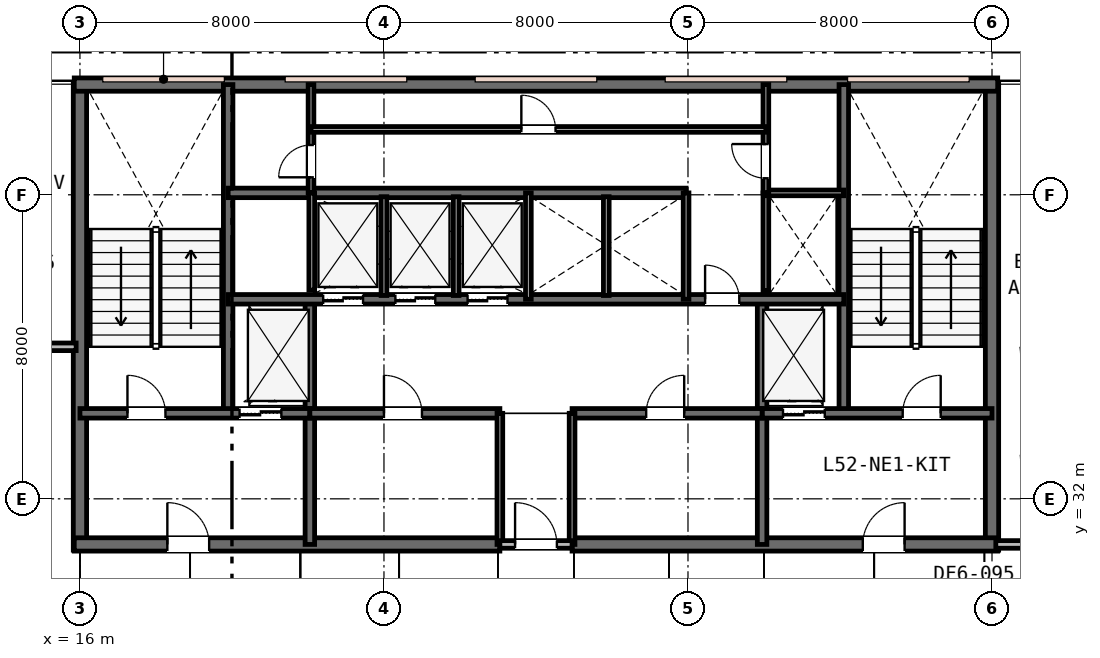
"""IFC4 building model, lengths in metres.
Left out: names, types, materials, properties, quantities, classifications, styles, units other than length and angle.
Written with IfcOpenShell. Run it as: python <this file> out.ifc"""

import sys

from ifc_helpers import new_model, si_unit, direction, frame, frame_2d, origin, place, context, subcontext, project, spatial, rectangle, extrude, element, fill, save


model = new_model("IFC4")
c1 = context("Model", 3, precision=1e-05, world=origin(), true_north=direction((0.0, 1.0)))
c2 = subcontext(c1, "Body", "Model", "MODEL_VIEW")
j1 = project(units=[si_unit("LENGTHUNIT", "METRE"), si_unit("PLANEANGLEUNIT", "RADIAN")], contexts=[c1])
p1 = place(None, origin())
s1 = spatial("IfcSite", under=j1, at=p1, CompositionType="ELEMENT")
p2 = place(p1, origin())
s2 = spatial("IfcBuilding", under=s1, at=p2, CompositionType="ELEMENT")
p3 = place(p2, frame((0.0, 0.0, 201.0)))
s3 = spatial("IfcBuildingStorey", under=s2, at=p3, CompositionType="ELEMENT", Elevation=201.0)
for number, where, z_axis, x_axis in (
    (1, (16.0, 30.65, 0.0), (0.0, 0.0, 1.0), (0.0, 1.0, 0.0)),
    (2, (40.0, 30.65, 0.0), (0.0, 0.0, 1.0), (0.0, 1.0, 0.0)),
):
    element("IfcWall", number, at=place(p3, frame(where, z_axis=z_axis, x_axis=x_axis)), inside=s3, PredefinedType="SHEAR", context=c2, shape_type="SweptSolid", body=[
        extrude(rectangle(XDim=12.3, YDim=0.35, at=frame_2d((6.15, 0.0))), origin(), (0.0, 0.0, 1.0), 3.6),
    ])
p4 = place(p3, frame((15.85, 42.9, 0.0), z_axis=(0.0, 0.0, 1.0), x_axis=(1.0, 0.0, 0.0)))
e3 = element("IfcWall", 3, at=p4, inside=s3, PredefinedType="SHEAR", context=c2, shape_type="SweptSolid", body=[
    extrude(rectangle(XDim=24.3, YDim=0.35, at=frame_2d((12.15, 0.0))), origin(), (0.0, 0.0, 1.0), 3.6),
])
p5 = place(p3, frame((15.85, 30.8, 0.0), z_axis=(0.0, 0.0, 1.0), x_axis=(1.0, 0.0, 0.0)))
e4 = element("IfcWall", 4, at=p5, inside=s3, PredefinedType="SHEAR", context=c2, shape_type="SweptSolid", body=[
    extrude(rectangle(XDim=11.2, YDim=0.35, at=frame_2d((5.6, 0.0))), origin(), (0.0, 0.0, 1.0), 3.6),
])
p6 = place(p5, frame((2.45, 0.0, 0.0)))
e5 = element("IfcOpeningElement", 5, at=p6, cuts=e4, PredefinedType="OPENING", context=c2, shape_type="SweptSolid", body=[
    extrude(rectangle(XDim=1.1, YDim=2.15, at=frame_2d((0.55, 1.075))), frame((0.0, 0.185, 0.0), z_axis=(0.0, -1.0, 0.0), x_axis=(1.0, 0.0, 0.0)), (0.0, 0.0, 1.0), 0.37),
])
p7 = place(p3, frame((28.95, 30.8, 0.0), z_axis=(0.0, 0.0, 1.0), x_axis=(1.0, 0.0, 0.0)))
e6 = element("IfcWall", 6, at=p7, inside=s3, PredefinedType="SHEAR", context=c2, shape_type="SweptSolid", body=[
    extrude(rectangle(XDim=11.2, YDim=0.35, at=frame_2d((5.6, 0.0))), origin(), (0.0, 0.0, 1.0), 3.6),
])
p8 = place(p7, frame((7.65, 0.0, 0.0)))
e7 = element("IfcOpeningElement", 7, at=p8, cuts=e6, PredefinedType="OPENING", context=c2, shape_type="SweptSolid", body=[
    extrude(rectangle(XDim=1.1, YDim=2.15, at=frame_2d((0.55, 1.075))), frame((0.0, 0.185, 0.0), z_axis=(0.0, -1.0, 0.0), x_axis=(1.0, 0.0, 0.0)), (0.0, 0.0, 1.0), 0.37),
])
for number, where, z_axis, x_axis in (
    (8, (19.9, 34.25, 0.0), (0.0, 0.0, 1.0), (0.0, 1.0, 0.0)),
    (9, (36.1, 34.25, 0.0), (0.0, 0.0, 1.0), (0.0, 1.0, 0.0)),
):
    element("IfcWall", number, at=place(p3, frame(where, z_axis=z_axis, x_axis=x_axis)), inside=s3, PredefinedType="SHEAR", context=c2, shape_type="SweptSolid", body=[
        extrude(rectangle(XDim=8.65, YDim=0.25, at=frame_2d((4.325, 0.0))), origin(), (0.0, 0.0, 1.0), 3.6),
    ])
for number, where, z_axis, x_axis in (
    (10, (22.05, 30.8, 0.0), (0.0, 0.0, 1.0), (0.0, 1.0, 0.0)),
    (11, (33.95, 30.8, 0.0), (0.0, 0.0, 1.0), (0.0, 1.0, 0.0)),
):
    element("IfcWall", number, at=place(p3, frame(where, z_axis=z_axis, x_axis=x_axis)), inside=s3, PredefinedType="SHEAR", context=c2, shape_type="SweptSolid", body=[
        extrude(rectangle(XDim=6.45, YDim=0.25, at=frame_2d((3.225, 0.0))), origin(), (0.0, 0.0, 1.0), 3.6),
    ])
p9 = place(p3, frame((16.0, 34.25, 0.0), z_axis=(0.0, 0.0, 1.0), x_axis=(1.0, 0.0, 0.0)))
e12 = element("IfcWall", 12, at=p9, inside=s3, PredefinedType="SHEAR", context=c2, shape_type="SweptSolid", body=[
    extrude(rectangle(XDim=6.05, YDim=0.25, at=frame_2d((3.025, 0.0))), origin(), (0.0, 0.0, 1.0), 3.6),
])
p10 = place(p9, frame((1.25, 0.0, 0.0)))
e13 = element("IfcOpeningElement", 13, at=p10, cuts=e12, PredefinedType="OPENING", context=c2, shape_type="SweptSolid", body=[
    extrude(rectangle(XDim=1.0, YDim=2.15, at=frame_2d((0.5, 1.075))), frame((0.0, 0.135, 0.0), z_axis=(0.0, -1.0, 0.0), x_axis=(1.0, 0.0, 0.0)), (0.0, 0.0, 1.0), 0.27),
])
p11 = place(p9, frame((4.2, 0.0, 0.0)))
e14 = element("IfcOpeningElement", 14, at=p11, cuts=e12, PredefinedType="OPENING", context=c2, shape_type="SweptSolid", body=[
    extrude(rectangle(XDim=1.1, YDim=2.15, at=frame_2d((0.55, 1.075))), frame((0.0, 0.135, 0.0), z_axis=(0.0, -1.0, 0.0), x_axis=(1.0, 0.0, 0.0)), (0.0, 0.0, 1.0), 0.27),
])
p12 = place(p3, frame((33.95, 34.25, 0.0), z_axis=(0.0, 0.0, 1.0), x_axis=(1.0, 0.0, 0.0)))
e15 = element("IfcWall", 15, at=p12, inside=s3, PredefinedType="SHEAR", context=c2, shape_type="SweptSolid", body=[
    extrude(rectangle(XDim=6.05, YDim=0.25, at=frame_2d((3.025, 0.0))), origin(), (0.0, 0.0, 1.0), 3.6),
])
p13 = place(p12, frame((3.7, 0.0, 0.0)))
e16 = element("IfcOpeningElement", 16, at=p13, cuts=e15, PredefinedType="OPENING", context=c2, shape_type="SweptSolid", body=[
    extrude(rectangle(XDim=1.0, YDim=2.15, at=frame_2d((0.5, 1.075))), frame((0.0, 0.135, 0.0), z_axis=(0.0, -1.0, 0.0), x_axis=(1.0, 0.0, 0.0)), (0.0, 0.0, 1.0), 0.27),
])
p14 = place(p12, frame((0.55, 0.0, 0.0)))
e17 = element("IfcOpeningElement", 17, at=p14, cuts=e15, PredefinedType="OPENING", context=c2, shape_type="SweptSolid", body=[
    extrude(rectangle(XDim=1.1, YDim=2.15, at=frame_2d((0.55, 1.075))), frame((0.0, 0.135, 0.0), z_axis=(0.0, -1.0, 0.0), x_axis=(1.0, 0.0, 0.0)), (0.0, 0.0, 1.0), 0.27),
])
p15 = place(p3, frame((22.05, 34.25, 0.0), z_axis=(0.0, 0.0, 1.0), x_axis=(1.0, 0.0, 0.0)))
e18 = element("IfcWall", 18, at=p15, inside=s3, PredefinedType="SHEAR", context=c2, shape_type="SweptSolid", body=[
    extrude(rectangle(XDim=5.0, YDim=0.25, at=frame_2d((2.5, 0.0))), origin(), (0.0, 0.0, 1.0), 3.6),
])
p16 = place(p15, frame((1.95, 0.0, 0.0)))
e19 = element("IfcOpeningElement", 19, at=p16, cuts=e18, PredefinedType="OPENING", context=c2, shape_type="SweptSolid", body=[
    extrude(rectangle(XDim=1.0, YDim=2.15, at=frame_2d((0.5, 1.075))), frame((0.0, 0.135, 0.0), z_axis=(0.0, -1.0, 0.0), x_axis=(1.0, 0.0, 0.0)), (0.0, 0.0, 1.0), 0.27),
])
p17 = place(p3, frame((28.95, 34.25, 0.0), z_axis=(0.0, 0.0, 1.0), x_axis=(1.0, 0.0, 0.0)))
e20 = element("IfcWall", 20, at=p17, inside=s3, PredefinedType="SHEAR", context=c2, shape_type="SweptSolid", body=[
    extrude(rectangle(XDim=5.0, YDim=0.25, at=frame_2d((2.5, 0.0))), origin(), (0.0, 0.0, 1.0), 3.6),
])
p18 = place(p17, frame((1.95, 0.0, 0.0)))
e21 = element("IfcOpeningElement", 21, at=p18, cuts=e20, PredefinedType="OPENING", context=c2, shape_type="SweptSolid", body=[
    extrude(rectangle(XDim=1.0, YDim=2.15, at=frame_2d((0.5, 1.075))), frame((0.0, 0.135, 0.0), z_axis=(0.0, -1.0, 0.0), x_axis=(1.0, 0.0, 0.0)), (0.0, 0.0, 1.0), 0.27),
])
p19 = place(p3, frame((19.9, 37.25, 0.0), z_axis=(0.0, 0.0, 1.0), x_axis=(1.0, 0.0, 0.0)))
e22 = element("IfcWall", 22, at=p19, inside=s3, PredefinedType="SHEAR", context=c2, shape_type="SweptSolid", body=[
    extrude(rectangle(XDim=16.2, YDim=0.25, at=frame_2d((8.1, 0.0))), origin(), (0.0, 0.0, 1.0), 3.6),
])
p20 = place(p19, frame((12.55, 0.0, 0.0)))
e23 = element("IfcOpeningElement", 23, at=p20, cuts=e22, PredefinedType="OPENING", context=c2, shape_type="SweptSolid", body=[
    extrude(rectangle(XDim=0.9, YDim=2.15, at=frame_2d((0.45, 1.075))), frame((0.0, 0.135, 0.0), z_axis=(0.0, -1.0, 0.0), x_axis=(1.0, 0.0, 0.0)), (0.0, 0.0, 1.0), 0.27),
])
p21 = place(p19, frame((2.5, 0.0, 0.0)))
e24 = element("IfcOpeningElement", 24, at=p21, cuts=e22, PredefinedType="OPENING", context=c2, shape_type="SweptSolid", body=[
    extrude(rectangle(XDim=1.05, YDim=2.15, at=frame_2d((0.525, 1.075))), frame((0.0, 0.135, 0.0), z_axis=(0.0, -1.0, 0.0), x_axis=(1.0, 0.0, 0.0)), (0.0, 0.0, 1.0), 0.27),
])
p22 = place(p19, frame((4.4, 0.0, 0.0)))
e25 = element("IfcOpeningElement", 25, at=p22, cuts=e22, PredefinedType="OPENING", context=c2, shape_type="SweptSolid", body=[
    extrude(rectangle(XDim=1.05, YDim=2.15, at=frame_2d((0.525, 1.075))), frame((0.0, 0.135, 0.0), z_axis=(0.0, -1.0, 0.0), x_axis=(1.0, 0.0, 0.0)), (0.0, 0.0, 1.0), 0.27),
])
p23 = place(p19, frame((6.3, 0.0, 0.0)))
e26 = element("IfcOpeningElement", 26, at=p23, cuts=e22, PredefinedType="OPENING", context=c2, shape_type="SweptSolid", body=[
    extrude(rectangle(XDim=1.05, YDim=2.15, at=frame_2d((0.525, 1.075))), frame((0.0, 0.135, 0.0), z_axis=(0.0, -1.0, 0.0), x_axis=(1.0, 0.0, 0.0)), (0.0, 0.0, 1.0), 0.27),
])
p24 = place(p3, frame((19.9, 40.05, 0.0), z_axis=(0.0, 0.0, 1.0), x_axis=(1.0, 0.0, 0.0)))
e27 = element("IfcWall", 27, at=p24, inside=s3, PredefinedType="SHEAR", context=c2, shape_type="SweptSolid", body=[
    extrude(rectangle(XDim=12.05, YDim=0.25, at=frame_2d((6.025, 0.0))), origin(), (0.0, 0.0, 1.0), 3.6),
])
for number, where, z_axis, x_axis in (
    (28, (27.05, 30.8, 0.0), (0.0, 0.0, 1.0), (0.0, 1.0, 0.0)),
    (29, (28.95, 30.8, 0.0), (0.0, 0.0, 1.0), (0.0, 1.0, 0.0)),
):
    element("IfcWall", number, at=place(p3, frame(where, z_axis=z_axis, x_axis=x_axis)), inside=s3, PredefinedType="PLUMBINGWALL", context=c2, shape_type="SweptSolid", body=[
        extrude(rectangle(XDim=3.45, YDim=0.15, at=frame_2d((1.725, 0.0))), origin(), (0.0, 0.0, 1.0), 3.02),
    ])
p25 = place(p3, frame((27.05, 30.8, 0.0), z_axis=(0.0, 0.0, 1.0), x_axis=(1.0, 0.0, 0.0)))
e30 = element("IfcWall", 30, at=p25, inside=s3, PredefinedType="PARTITIONING", context=c2, shape_type="SweptSolid", body=[
    extrude(rectangle(XDim=1.9, YDim=0.2, at=frame_2d((0.95, 0.0))), origin(), (0.0, 0.0, 1.0), 3.02),
])
p26 = place(p25, frame((0.4, 0.0, 0.0)))
e31 = element("IfcOpeningElement", 31, at=p26, cuts=e30, PredefinedType="OPENING", context=c2, shape_type="SweptSolid", body=[
    extrude(rectangle(XDim=1.1, YDim=2.15, at=frame_2d((0.55, 1.075))), frame((0.0, 0.11, 0.0), z_axis=(0.0, -1.0, 0.0), x_axis=(1.0, 0.0, 0.0)), (0.0, 0.0, 1.0), 0.22),
])
p27 = place(p3, frame((22.1, 37.49, 0.0), z_axis=(0.0, 0.0, 1.0), x_axis=(0.0, 1.0, 0.0)))
e32 = element("IfcWall", 32, at=p27, inside=s3, PredefinedType="PLUMBINGWALL", context=c2, shape_type="SweptSolid", body=[
    extrude(rectangle(XDim=2.56, YDim=0.15, at=frame_2d((1.28, 0.0))), origin(), (0.0, 0.0, 1.0), 3.33),
])
p28 = place(p3, frame((27.8, 37.25, 0.0), z_axis=(0.0, 0.0, 1.0), x_axis=(0.0, 1.0, 0.0)))
e33 = element("IfcWall", 33, at=p28, inside=s3, PredefinedType="PLUMBINGWALL", context=c2, shape_type="SweptSolid", body=[
    extrude(rectangle(XDim=2.8, YDim=0.15, at=frame_2d((1.4, 0.0))), origin(), (0.0, 0.0, 1.0), 3.33),
])
for number, where, z_axis, x_axis in (
    (34, (24.0, 37.35, 0.0), (0.0, 0.0, 1.0), (0.0, 1.0, 0.0)),
    (35, (25.9, 37.35, 0.0), (0.0, 0.0, 1.0), (0.0, 1.0, 0.0)),
):
    element("IfcWall", number, at=place(p3, frame(where, z_axis=z_axis, x_axis=x_axis)), inside=s3, PredefinedType="PLUMBINGWALL", context=c2, shape_type="SweptSolid", body=[
        extrude(rectangle(XDim=2.6, YDim=0.15, at=frame_2d((1.3, 0.0))), origin(), (0.0, 0.0, 1.0), 3.33),
    ])
p29 = place(p3, frame((31.95, 37.25, 0.0), z_axis=(0.0, 0.0, 1.0), x_axis=(0.0, 1.0, 0.0)))
e36 = element("IfcWall", 36, at=p29, inside=s3, PredefinedType="PLUMBINGWALL", context=c2, shape_type="SweptSolid", body=[
    extrude(rectangle(XDim=2.8, YDim=0.15, at=frame_2d((1.4, 0.0))), origin(), (0.0, 0.0, 1.0), 3.33),
])
p30 = place(p3, frame((29.85, 37.35, 0.0), z_axis=(0.0, 0.0, 1.0), x_axis=(0.0, 1.0, 0.0)))
e37 = element("IfcWall", 37, at=p30, inside=s3, PredefinedType="PLUMBINGWALL", context=c2, shape_type="SweptSolid", body=[
    extrude(rectangle(XDim=2.6, YDim=0.15, at=frame_2d((1.3, 0.0))), origin(), (0.0, 0.0, 1.0), 3.33),
])
p31 = place(p3, frame((34.05, 37.473, 0.0), z_axis=(0.0, 0.0, 1.0), x_axis=(0.0, 1.0, 0.0)))
e38 = element("IfcWall", 38, at=p31, inside=s3, PredefinedType="PLUMBINGWALL", context=c2, shape_type="SweptSolid", body=[
    extrude(rectangle(XDim=2.577, YDim=0.15, at=frame_2d((1.288, 0.0))), origin(), (0.0, 0.0, 1.0), 3.33),
])
p32 = place(p3, frame((34.05, 40.05, 0.0), z_axis=(0.0, 0.0, 1.0), x_axis=(1.0, 0.0, 0.0)))
e39 = element("IfcWall", 39, at=p32, inside=s3, PredefinedType="PARTITIONING", context=c2, shape_type="SweptSolid", body=[
    extrude(rectangle(XDim=2.05, YDim=0.15, at=frame_2d((1.025, 0.0))), origin(), (0.0, 0.0, 1.0), 3.33),
])
p33 = place(p3, frame((34.05, 40.05, 0.0), z_axis=(0.0, 0.0, 1.0), x_axis=(0.0, 1.0, 0.0)))
e40 = element("IfcWall", 40, at=p33, inside=s3, PredefinedType="PARTITIONING", context=c2, shape_type="SweptSolid", body=[
    extrude(rectangle(XDim=2.85, YDim=0.15, at=frame_2d((1.425, 0.0))), origin(), (0.0, 0.0, 1.0), 3.33),
])
p34 = place(p33, frame((0.385, 0.0, 0.0)))
e41 = element("IfcOpeningElement", 41, at=p34, cuts=e40, PredefinedType="OPENING", context=c2, shape_type="SweptSolid", body=[
    extrude(rectangle(XDim=0.9, YDim=2.15, at=frame_2d((0.45, 1.075))), frame((0.0, 0.085, 0.0), z_axis=(0.0, -1.0, 0.0), x_axis=(1.0, 0.0, 0.0)), (0.0, 0.0, 1.0), 0.17),
])
p35 = place(p3, frame((22.08, 40.05, 0.0), z_axis=(0.0, 0.0, 1.0), x_axis=(0.0, 1.0, 0.0)))
e42 = element("IfcWall", 42, at=p35, inside=s3, PredefinedType="PARTITIONING", context=c2, shape_type="SweptSolid", body=[
    extrude(rectangle(XDim=2.85, YDim=0.15, at=frame_2d((1.425, 0.0))), origin(), (0.0, 0.0, 1.0), 3.33),
])
p36 = place(p35, frame((0.41, 0.0, 0.0)))
e43 = element("IfcOpeningElement", 43, at=p36, cuts=e42, PredefinedType="OPENING", context=c2, shape_type="SweptSolid", body=[
    extrude(rectangle(XDim=0.85, YDim=2.15, at=frame_2d((0.425, 1.075))), frame((0.0, 0.085, 0.0), z_axis=(0.0, -1.0, 0.0), x_axis=(1.0, 0.0, 0.0)), (0.0, 0.0, 1.0), 0.17),
])
p37 = place(p3, frame((22.08, 41.72, 0.0), z_axis=(0.0, 0.0, 1.0), x_axis=(1.0, 0.0, 0.0)))
e44 = element("IfcWall", 44, at=p37, inside=s3, PredefinedType="PARTITIONING", context=c2, shape_type="SweptSolid", body=[
    extrude(rectangle(XDim=11.97, YDim=0.15, at=frame_2d((5.985, 0.0))), origin(), (0.0, 0.0, 1.0), 3.33),
])
p38 = place(p37, frame((5.535, 0.0, 0.0)))
e45 = element("IfcOpeningElement", 45, at=p38, cuts=e44, PredefinedType="OPENING", context=c2, shape_type="SweptSolid", body=[
    extrude(rectangle(XDim=0.9, YDim=2.15, at=frame_2d((0.45, 1.075))), frame((0.0, 0.085, 0.0), z_axis=(0.0, -1.0, 0.0), x_axis=(1.0, 0.0, 0.0)), (0.0, 0.0, 1.0), 0.17),
])
p39 = place(p3, frame((5.1, 36.0, 0.0), z_axis=(0.0, 0.0, 1.0), x_axis=(1.0, 0.0, 0.0)))
e46 = element("IfcWall", 46, at=p39, inside=s3, PredefinedType="PARTITIONING", context=c2, shape_type="SweptSolid", body=[
    extrude(rectangle(XDim=10.8, YDim=0.2, at=frame_2d((5.4, 0.0))), origin(), (0.0, 0.0, 1.0), 3.04),
])
p40 = place(p39, frame((6.975, 0.0, 0.0)))
e47 = element("IfcOpeningElement", 47, at=p40, cuts=e46, PredefinedType="OPENING", context=c2, shape_type="SweptSolid", body=[
    extrude(rectangle(XDim=0.95, YDim=2.15, at=frame_2d((0.475, 1.075))), frame((0.0, 0.11, 0.0), z_axis=(0.0, -1.0, 0.0), x_axis=(1.0, 0.0, 0.0)), (0.0, 0.0, 1.0), 0.22),
])
p41 = place(p3, frame((40.1, 30.8, 0.0), z_axis=(0.0, 0.0, 1.0), x_axis=(1.0, 0.0, 0.0)))
e48 = element("IfcWall", 48, at=p41, inside=s3, PredefinedType="PARTITIONING", context=c2, shape_type="SweptSolid", body=[
    extrude(rectangle(XDim=3.1, YDim=0.2, at=frame_2d((1.55, 0.0))), origin(), (0.0, 0.0, 1.0), 2.72),
])
p42 = place(p41, frame((1.075, 0.0, 0.0)))
e49 = element("IfcOpeningElement", 49, at=p42, cuts=e48, PredefinedType="OPENING", context=c2, shape_type="SweptSolid", body=[
    extrude(rectangle(XDim=0.95, YDim=2.15, at=frame_2d((0.475, 1.075))), frame((0.0, 0.11, 0.0), z_axis=(0.0, -1.0, 0.0), x_axis=(1.0, 0.0, 0.0)), (0.0, 0.0, 1.0), 0.22),
])
p43 = place(p26, origin())
e50 = element("IfcDoor", 50, at=p43, inside=s3, OperationType="SINGLE_SWING_LEFT", PredefinedType="DOOR", context=c2, shape_type="SweptSolid", body=[
    extrude(rectangle(XDim=1.1, YDim=2.15, at=frame_2d((0.55, 1.075))), frame((0.0, 0.025, 0.0), z_axis=(0.0, -1.0, 0.0), x_axis=(1.0, 0.0, 0.0)), (0.0, 0.0, 1.0), 0.05),
])
fill(e31, e50)
p44 = place(p10, origin())
e51 = element("IfcDoor", 51, at=p44, inside=s3, OperationType="SINGLE_SWING_LEFT", PredefinedType="DOOR", context=c2, shape_type="SweptSolid", body=[
    extrude(rectangle(XDim=1.0, YDim=2.15, at=frame_2d((0.5, 1.075))), frame((0.0, 0.025, 0.0), z_axis=(0.0, -1.0, 0.0), x_axis=(1.0, 0.0, 0.0)), (0.0, 0.0, 1.0), 0.05),
])
fill(e13, e51)
p45 = place(p13, origin())
e52 = element("IfcDoor", 52, at=p45, inside=s3, OperationType="SINGLE_SWING_RIGHT", PredefinedType="DOOR", context=c2, shape_type="SweptSolid", body=[
    extrude(rectangle(XDim=1.0, YDim=2.15, at=frame_2d((0.5, 1.075))), frame((0.0, 0.025, 0.0), z_axis=(0.0, -1.0, 0.0), x_axis=(1.0, 0.0, 0.0)), (0.0, 0.0, 1.0), 0.05),
])
fill(e16, e52)
p46 = place(p6, origin())
e53 = element("IfcDoor", 53, at=p46, inside=s3, OperationType="SINGLE_SWING_LEFT", PredefinedType="DOOR", context=c2, shape_type="SweptSolid", body=[
    extrude(rectangle(XDim=1.1, YDim=2.15, at=frame_2d((0.55, 1.075))), frame((0.0, 0.025, 0.0), z_axis=(0.0, -1.0, 0.0), x_axis=(1.0, 0.0, 0.0)), (0.0, 0.0, 1.0), 0.05),
])
fill(e5, e53)
p47 = place(p8, origin())
e54 = element("IfcDoor", 54, at=p47, inside=s3, OperationType="SINGLE_SWING_RIGHT", PredefinedType="DOOR", context=c2, shape_type="SweptSolid", body=[
    extrude(rectangle(XDim=1.1, YDim=2.15, at=frame_2d((0.55, 1.075))), frame((0.0, 0.025, 0.0), z_axis=(0.0, -1.0, 0.0), x_axis=(1.0, 0.0, 0.0)), (0.0, 0.0, 1.0), 0.05),
])
fill(e7, e54)
p48 = place(p16, origin())
e55 = element("IfcDoor", 55, at=p48, inside=s3, OperationType="SINGLE_SWING_LEFT", PredefinedType="DOOR", context=c2, shape_type="SweptSolid", body=[
    extrude(rectangle(XDim=1.0, YDim=2.15, at=frame_2d((0.5, 1.075))), frame((0.0, 0.025, 0.0), z_axis=(0.0, -1.0, 0.0), x_axis=(1.0, 0.0, 0.0)), (0.0, 0.0, 1.0), 0.05),
])
fill(e19, e55)
p49 = place(p18, origin())
e56 = element("IfcDoor", 56, at=p49, inside=s3, OperationType="SINGLE_SWING_RIGHT", PredefinedType="DOOR", context=c2, shape_type="SweptSolid", body=[
    extrude(rectangle(XDim=1.0, YDim=2.15, at=frame_2d((0.5, 1.075))), frame((0.0, 0.025, 0.0), z_axis=(0.0, -1.0, 0.0), x_axis=(1.0, 0.0, 0.0)), (0.0, 0.0, 1.0), 0.05),
])
fill(e21, e56)
p50 = place(p20, origin())
e57 = element("IfcDoor", 57, at=p50, inside=s3, OperationType="SINGLE_SWING_LEFT", PredefinedType="DOOR", context=c2, shape_type="SweptSolid", body=[
    extrude(rectangle(XDim=0.9, YDim=2.15, at=frame_2d((0.45, 1.075))), frame((0.0, 0.025, 0.0), z_axis=(0.0, -1.0, 0.0), x_axis=(1.0, 0.0, 0.0)), (0.0, 0.0, 1.0), 0.05),
])
fill(e23, e57)
p51 = place(p34, origin())
e58 = element("IfcDoor", 58, at=p51, inside=s3, OperationType="SINGLE_SWING_RIGHT", PredefinedType="DOOR", context=c2, shape_type="SweptSolid", body=[
    extrude(rectangle(XDim=0.9, YDim=2.15, at=frame_2d((0.45, 1.075))), frame((0.0, 0.025, 0.0), z_axis=(0.0, -1.0, 0.0), x_axis=(1.0, 0.0, 0.0)), (0.0, 0.0, 1.0), 0.05),
])
fill(e41, e58)
p52 = place(p36, origin())
e59 = element("IfcDoor", 59, at=p52, inside=s3, OperationType="SINGLE_SWING_LEFT", PredefinedType="DOOR", context=c2, shape_type="SweptSolid", body=[
    extrude(rectangle(XDim=0.85, YDim=2.15, at=frame_2d((0.425, 1.075))), frame((0.0, 0.025, 0.0), z_axis=(0.0, -1.0, 0.0), x_axis=(1.0, 0.0, 0.0)), (0.0, 0.0, 1.0), 0.05),
])
fill(e43, e59)
p53 = place(p38, origin())
e60 = element("IfcDoor", 60, at=p53, inside=s3, OperationType="SINGLE_SWING_LEFT", PredefinedType="DOOR", context=c2, shape_type="SweptSolid", body=[
    extrude(rectangle(XDim=0.9, YDim=2.15, at=frame_2d((0.45, 1.075))), frame((0.0, 0.025, 0.0), z_axis=(0.0, -1.0, 0.0), x_axis=(1.0, 0.0, 0.0)), (0.0, 0.0, 1.0), 0.05),
])
fill(e45, e60)
p54 = place(p11, origin())
e61 = element("IfcDoor", 61, at=p54, inside=s3, OperationType="DOUBLE_DOOR_SLIDING", PredefinedType="DOOR", context=c2, shape_type="SweptSolid", body=[
    extrude(rectangle(XDim=1.1, YDim=2.15, at=frame_2d((0.55, 1.075))), frame((0.0, 0.025, 0.0), z_axis=(0.0, -1.0, 0.0), x_axis=(1.0, 0.0, 0.0)), (0.0, 0.0, 1.0), 0.05),
])
fill(e14, e61)
p55 = place(p14, origin())
e62 = element("IfcDoor", 62, at=p55, inside=s3, OperationType="DOUBLE_DOOR_SLIDING", PredefinedType="DOOR", context=c2, shape_type="SweptSolid", body=[
    extrude(rectangle(XDim=1.1, YDim=2.15, at=frame_2d((0.55, 1.075))), frame((0.0, 0.025, 0.0), z_axis=(0.0, -1.0, 0.0), x_axis=(1.0, 0.0, 0.0)), (0.0, 0.0, 1.0), 0.05),
])
fill(e17, e62)
p56 = place(p21, origin())
e63 = element("IfcDoor", 63, at=p56, inside=s3, OperationType="DOUBLE_DOOR_SLIDING", PredefinedType="DOOR", context=c2, shape_type="SweptSolid", body=[
    extrude(rectangle(XDim=1.05, YDim=2.15, at=frame_2d((0.525, 1.075))), frame((0.0, 0.025, 0.0), z_axis=(0.0, -1.0, 0.0), x_axis=(1.0, 0.0, 0.0)), (0.0, 0.0, 1.0), 0.05),
])
fill(e24, e63)
p57 = place(p22, origin())
e64 = element("IfcDoor", 64, at=p57, inside=s3, OperationType="DOUBLE_DOOR_SLIDING", PredefinedType="DOOR", context=c2, shape_type="SweptSolid", body=[
    extrude(rectangle(XDim=1.05, YDim=2.15, at=frame_2d((0.525, 1.075))), frame((0.0, 0.025, 0.0), z_axis=(0.0, -1.0, 0.0), x_axis=(1.0, 0.0, 0.0)), (0.0, 0.0, 1.0), 0.05),
])
fill(e25, e64)
p58 = place(p23, origin())
e65 = element("IfcDoor", 65, at=p58, inside=s3, OperationType="DOUBLE_DOOR_SLIDING", PredefinedType="DOOR", context=c2, shape_type="SweptSolid", body=[
    extrude(rectangle(XDim=1.05, YDim=2.15, at=frame_2d((0.525, 1.075))), frame((0.0, 0.025, 0.0), z_axis=(0.0, -1.0, 0.0), x_axis=(1.0, 0.0, 0.0)), (0.0, 0.0, 1.0), 0.05),
])
fill(e26, e65)
save(model, sys.argv[1])
